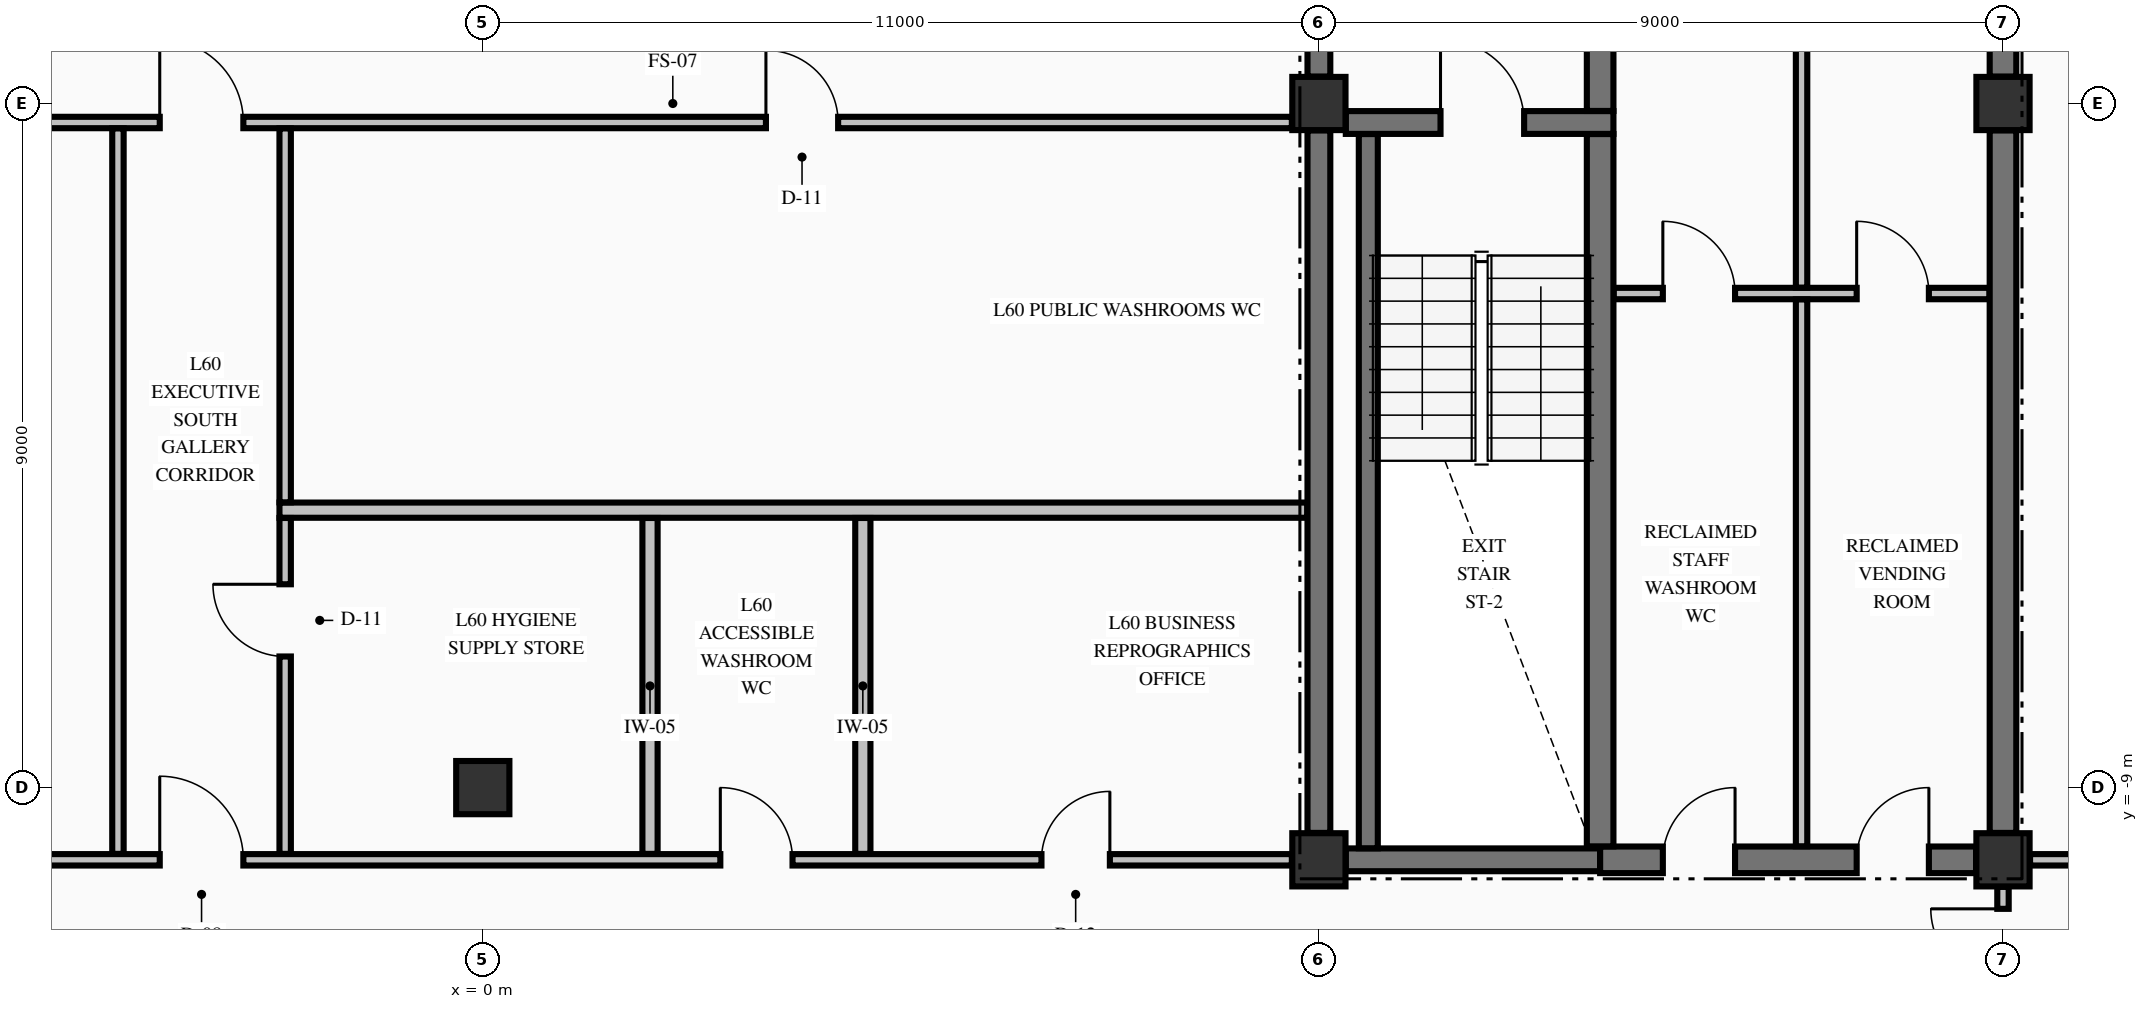
"""IFC4 building model, lengths in metres.
Left out: names, types, materials, properties, quantities, classifications, styles, units other than length and angle.
Written with IfcOpenShell. Run it as: python <this file> out.ifc"""

import sys

from ifc_helpers import new_model, si_unit, direction, frame, frame_2d, origin, origin_2d, place, context, subcontext, project, spatial, rectangle, extrude, element, fill, save


model = new_model("IFC4")
c1 = context("Model", 3, precision=1e-05, world=origin(), true_north=direction((0.0, 1.0)))
c2 = subcontext(c1, "Body", "Model", "MODEL_VIEW")
j1 = project(units=[si_unit("LENGTHUNIT", "METRE"), si_unit("PLANEANGLEUNIT", "RADIAN")], contexts=[c1])
p1 = place(None, origin())
s1 = spatial("IfcSite", under=j1, at=p1, CompositionType="ELEMENT")
p2 = place(p1, origin())
s2 = spatial("IfcBuilding", under=s1, at=p2, CompositionType="ELEMENT")
p3 = place(p2, frame((0.0, 0.0, 230.05)))
s3 = spatial("IfcBuildingStorey", under=s2, at=p3, CompositionType="ELEMENT", Elevation=230.05)
for number, where, z_axis, x_axis in (
    (1, (11.0, -9.95, -0.25), (0.0, 0.0, 1.0), (1.0, 0.0, 0.0)),
    (2, (11.0, 0.0, -0.25), (0.0, 0.0, 1.0), (1.0, 0.0, 0.0)),
    (3, (20.0, -9.95, -0.25), (0.0, 0.0, 1.0), (1.0, 0.0, 0.0)),
    (4, (0.0, -9.0, -0.25), (0.0, 0.0, 1.0), (1.0, 0.0, 0.0)),
    (5, (20.0, 0.0, -0.25), (0.0, 0.0, 1.0), (1.0, 0.0, 0.0)),
):
    element("IfcColumn", number, at=place(p3, frame(where, z_axis=z_axis, x_axis=x_axis)), inside=s3, PredefinedType="COLUMN", context=c2, shape_type="SweptSolid", body=[
        extrude(rectangle(XDim=0.7, YDim=0.7, at=origin_2d()), origin(), (0.0, 0.0, 1.0), 3.23),
    ])
p4 = place(p3, frame((11.354, -9.95, 0.0), z_axis=(0.0, 0.0, 1.0), x_axis=(1.0, 0.0, 0.0)))
e6 = element("IfcWall", 6, at=p4, inside=s3, PredefinedType="SHEAR", context=c2, shape_type="SweptSolid", body=[
    extrude(rectangle(XDim=3.346, YDim=0.3, at=frame_2d((1.673, 0.0))), origin(), (0.0, 0.0, 1.0), 2.98),
])
p5 = place(p3, frame((14.7, -9.95, 0.0), z_axis=(0.0, 0.0, 1.0), x_axis=(1.0, 0.0, 0.0)))
e7 = element("IfcWall", 7, at=p5, inside=s3, PredefinedType="SHEAR", context=c2, shape_type="SweptSolid", body=[
    extrude(rectangle(XDim=4.946, YDim=0.35, at=frame_2d((2.473, 0.0))), origin(), (0.0, 0.0, 1.0), 2.98),
])
p6 = place(p5, frame((0.825, 0.0, 0.0)))
e8 = element("IfcOpeningElement", 8, at=p6, cuts=e7, PredefinedType="OPENING", context=c2, shape_type="SweptSolid", body=[
    extrude(rectangle(XDim=0.95, YDim=2.15, at=frame_2d((0.475, 1.075))), frame((0.0, 0.185, 0.0), z_axis=(0.0, -1.0, 0.0), x_axis=(1.0, 0.0, 0.0)), (0.0, 0.0, 1.0), 0.37),
])
p7 = place(p5, frame((3.375, 0.0, 0.0)))
e9 = element("IfcOpeningElement", 9, at=p7, cuts=e7, PredefinedType="OPENING", context=c2, shape_type="SweptSolid", body=[
    extrude(rectangle(XDim=0.95, YDim=2.15, at=frame_2d((0.475, 1.075))), frame((0.0, 0.185, 0.0), z_axis=(0.0, -1.0, 0.0), x_axis=(1.0, 0.0, 0.0)), (0.0, 0.0, 1.0), 0.37),
])
p8 = place(p3, frame((11.354, -0.25, 0.0), z_axis=(0.0, 0.0, 1.0), x_axis=(1.0, 0.0, 0.0)))
e10 = element("IfcWall", 10, at=p8, inside=s3, PredefinedType="SHEAR", context=c2, shape_type="SweptSolid", body=[
    extrude(rectangle(XDim=3.521, YDim=0.3, at=frame_2d((1.76, 0.0))), origin(), (0.0, 0.0, 1.0), 2.98),
])
p9 = place(p8, frame((1.246, 0.0, 0.0)))
e11 = element("IfcOpeningElement", 11, at=p9, cuts=e10, PredefinedType="OPENING", context=c2, shape_type="SweptSolid", body=[
    extrude(rectangle(XDim=1.1, YDim=2.15, at=frame_2d((0.55, 1.075))), frame((0.0, 0.16, 0.0), z_axis=(0.0, -1.0, 0.0), x_axis=(1.0, 0.0, 0.0)), (0.0, 0.0, 1.0), 0.32),
])
p10 = place(p3, frame((-10.644, -9.95, 0.0), z_axis=(0.0, 0.0, 1.0), x_axis=(1.0, 0.0, 0.0)))
e12 = element("IfcWall", 12, at=p10, inside=s3, PredefinedType="PARTITIONING", context=c2, shape_type="SweptSolid", body=[
    extrude(rectangle(XDim=21.288, YDim=0.15, at=frame_2d((10.644, 0.0))), origin(), (0.0, 0.0, 1.0), 2.98),
])
p11 = place(p10, frame((6.394, 0.0, 0.0)))
e13 = element("IfcOpeningElement", 13, at=p11, cuts=e12, PredefinedType="OPENING", context=c2, shape_type="SweptSolid", body=[
    extrude(rectangle(XDim=1.1, YDim=2.15, at=frame_2d((0.55, 1.075))), frame((0.0, 0.085, 0.0), z_axis=(0.0, -1.0, 0.0), x_axis=(1.0, 0.0, 0.0)), (0.0, 0.0, 1.0), 0.17),
])
p12 = place(p10, frame((13.769, 0.0, 0.0)))
e14 = element("IfcOpeningElement", 14, at=p12, cuts=e12, PredefinedType="OPENING", context=c2, shape_type="SweptSolid", body=[
    extrude(rectangle(XDim=0.95, YDim=2.15, at=frame_2d((0.475, 1.075))), frame((0.0, 0.085, 0.0), z_axis=(0.0, -1.0, 0.0), x_axis=(1.0, 0.0, 0.0)), (0.0, 0.0, 1.0), 0.17),
])
p13 = place(p10, frame((17.994, 0.0, 0.0)))
e15 = element("IfcOpeningElement", 15, at=p13, cuts=e12, PredefinedType="OPENING", context=c2, shape_type="SweptSolid", body=[
    extrude(rectangle(XDim=0.9, YDim=2.15, at=frame_2d((0.45, 1.075))), frame((0.0, 0.085, 0.0), z_axis=(0.0, -1.0, 0.0), x_axis=(1.0, 0.0, 0.0)), (0.0, 0.0, 1.0), 0.17),
])
p14 = place(p3, frame((20.356, -9.95, 0.0), z_axis=(0.0, 0.0, 1.0), x_axis=(1.0, 0.0, 0.0)))
e16 = element("IfcWall", 16, at=p14, inside=s3, PredefinedType="PARTITIONING", context=c2, shape_type="SweptSolid", body=[
    extrude(rectangle(XDim=5.479, YDim=0.15, at=frame_2d((2.74, 0.0))), origin(), (0.0, 0.0, 1.0), 2.98),
])
p15 = place(p14, frame((2.144, 0.0, 0.0)))
e17 = element("IfcOpeningElement", 17, at=p15, cuts=e16, PredefinedType="OPENING", context=c2, shape_type="SweptSolid", body=[
    extrude(rectangle(XDim=1.0, YDim=2.15, at=frame_2d((0.5, 1.075))), frame((0.0, 0.085, 0.0), z_axis=(0.0, -1.0, 0.0), x_axis=(1.0, 0.0, 0.0)), (0.0, 0.0, 1.0), 0.17),
])
p16 = place(p3, frame((-2.675, -5.35, 0.0), z_axis=(0.0, 0.0, 1.0), x_axis=(1.0, 0.0, 0.0)))
e18 = element("IfcWall", 18, at=p16, inside=s3, PredefinedType="PARTITIONING", context=c2, shape_type="SweptSolid", body=[
    extrude(rectangle(XDim=13.522, YDim=0.2, at=frame_2d((6.761, 0.0))), origin(), (0.0, 0.0, 1.0), 2.98),
])
p17 = place(p3, frame((14.878, -2.5, 0.0), z_axis=(0.0, 0.0, 1.0), x_axis=(1.0, 0.0, 0.0)))
e19 = element("IfcWall", 19, at=p17, inside=s3, PredefinedType="PARTITIONING", context=c2, shape_type="SweptSolid", body=[
    extrude(rectangle(XDim=4.944, YDim=0.15, at=frame_2d((2.472, 0.0))), origin(), (0.0, 0.0, 1.0), 2.98),
])
p18 = place(p17, frame((0.647, 0.0, 0.0)))
e20 = element("IfcOpeningElement", 20, at=p18, cuts=e19, PredefinedType="OPENING", context=c2, shape_type="SweptSolid", body=[
    extrude(rectangle(XDim=0.95, YDim=2.15, at=frame_2d((0.475, 1.075))), frame((0.0, 0.085, 0.0), z_axis=(0.0, -1.0, 0.0), x_axis=(1.0, 0.0, 0.0)), (0.0, 0.0, 1.0), 0.17),
])
p19 = place(p17, frame((3.197, 0.0, 0.0)))
e21 = element("IfcOpeningElement", 21, at=p19, cuts=e19, PredefinedType="OPENING", context=c2, shape_type="SweptSolid", body=[
    extrude(rectangle(XDim=0.95, YDim=2.15, at=frame_2d((0.475, 1.075))), frame((0.0, 0.085, 0.0), z_axis=(0.0, -1.0, 0.0), x_axis=(1.0, 0.0, 0.0)), (0.0, 0.0, 1.0), 0.17),
])
p20 = place(p3, frame((-10.644, -0.25, 0.0), z_axis=(0.0, 0.0, 1.0), x_axis=(1.0, 0.0, 0.0)))
e22 = element("IfcWall", 22, at=p20, inside=s3, PredefinedType="PARTITIONING", context=c2, shape_type="SweptSolid", body=[
    extrude(rectangle(XDim=21.288, YDim=0.15, at=frame_2d((10.644, 0.0))), origin(), (0.0, 0.0, 1.0), 2.98),
])
p21 = place(p20, frame((6.394, 0.0, 0.0)))
e23 = element("IfcOpeningElement", 23, at=p21, cuts=e22, PredefinedType="OPENING", context=c2, shape_type="SweptSolid", body=[
    extrude(rectangle(XDim=1.1, YDim=2.15, at=frame_2d((0.55, 1.075))), frame((0.0, 0.085, 0.0), z_axis=(0.0, -1.0, 0.0), x_axis=(1.0, 0.0, 0.0)), (0.0, 0.0, 1.0), 0.17),
])
p22 = place(p20, frame((2.219, 0.0, 0.0)))
e24 = element("IfcOpeningElement", 24, at=p22, cuts=e22, PredefinedType="OPENING", context=c2, shape_type="SweptSolid", body=[
    extrude(rectangle(XDim=1.05, YDim=2.15, at=frame_2d((0.525, 1.075))), frame((0.0, 0.085, 0.0), z_axis=(0.0, -1.0, 0.0), x_axis=(1.0, 0.0, 0.0)), (0.0, 0.0, 1.0), 0.17),
])
p23 = place(p20, frame((14.369, 0.0, 0.0)))
e25 = element("IfcOpeningElement", 25, at=p23, cuts=e22, PredefinedType="OPENING", context=c2, shape_type="SweptSolid", body=[
    extrude(rectangle(XDim=0.95, YDim=2.15, at=frame_2d((0.475, 1.075))), frame((0.0, 0.085, 0.0), z_axis=(0.0, -1.0, 0.0), x_axis=(1.0, 0.0, 0.0)), (0.0, 0.0, 1.0), 0.17),
])
p24 = place(p3, frame((11.0, -9.596, 0.0), z_axis=(0.0, 0.0, 1.0), x_axis=(0.0, 1.0, 0.0)))
e26 = element("IfcWall", 26, at=p24, inside=s3, PredefinedType="SHEAR", context=c2, shape_type="SweptSolid", body=[
    extrude(rectangle(XDim=9.242, YDim=0.3, at=frame_2d((4.621, 0.0))), origin(), (0.0, 0.0, 1.0), 2.98),
])
p25 = place(p3, frame((11.0, 0.354, 0.0), z_axis=(0.0, 0.0, 1.0), x_axis=(0.0, 1.0, 0.0)))
e27 = element("IfcWall", 27, at=p25, inside=s3, PredefinedType="SHEAR", context=c2, shape_type="SweptSolid", body=[
    extrude(rectangle(XDim=2.394, YDim=0.3, at=frame_2d((1.197, 0.0))), origin(), (0.0, 0.0, 1.0), 2.98),
])
p26 = place(p25, frame((0.746, 0.0, 0.0)))
e28 = element("IfcOpeningElement", 28, at=p26, cuts=e27, PredefinedType="OPENING", context=c2, shape_type="SweptSolid", body=[
    extrude(rectangle(XDim=1.1, YDim=2.15, at=frame_2d((0.55, 1.075))), frame((0.0, 0.16, 0.0), z_axis=(0.0, -1.0, 0.0), x_axis=(1.0, 0.0, 0.0)), (0.0, 0.0, 1.0), 0.32),
])
p27 = place(p3, frame((11.65, -9.798, 0.0), z_axis=(0.0, 0.0, 1.0), x_axis=(0.0, 1.0, 0.0)))
e29 = element("IfcWall", 29, at=p27, inside=s3, PredefinedType="SOLIDWALL", context=c2, shape_type="SweptSolid", body=[
    extrude(rectangle(XDim=9.396, YDim=0.25, at=frame_2d((4.698, 0.0))), origin(), (0.0, 0.0, 1.0), 2.98),
])
p28 = place(p3, frame((14.7, -9.773, 0.0), z_axis=(0.0, 0.0, 1.0), x_axis=(0.0, 1.0, 0.0)))
e30 = element("IfcWall", 30, at=p28, inside=s3, PredefinedType="SHEAR", context=c2, shape_type="SweptSolid", body=[
    extrude(rectangle(XDim=9.371, YDim=0.35, at=frame_2d((4.686, 0.0))), origin(), (0.0, 0.0, 1.0), 2.98),
])
p29 = place(p3, frame((14.7, -0.098, 0.0), z_axis=(0.0, 0.0, 1.0), x_axis=(0.0, 1.0, 0.0)))
e31 = element("IfcWall", 31, at=p29, inside=s3, PredefinedType="SHEAR", context=c2, shape_type="SweptSolid", body=[
    extrude(rectangle(XDim=2.846, YDim=0.35, at=frame_2d((1.423, 0.0))), origin(), (0.0, 0.0, 1.0), 2.98),
])
p30 = place(p3, frame((20.0, -9.596, 0.0), z_axis=(0.0, 0.0, 1.0), x_axis=(0.0, 1.0, 0.0)))
e32 = element("IfcWall", 32, at=p30, inside=s3, PredefinedType="SHEAR", context=c2, shape_type="SweptSolid", body=[
    extrude(rectangle(XDim=9.242, YDim=0.35, at=frame_2d((4.621, 0.0))), origin(), (0.0, 0.0, 1.0), 2.98),
])
p31 = place(p3, frame((20.0, 0.354, 0.0), z_axis=(0.0, 0.0, 1.0), x_axis=(0.0, 1.0, 0.0)))
e33 = element("IfcWall", 33, at=p31, inside=s3, PredefinedType="SHEAR", context=c2, shape_type="SweptSolid", body=[
    extrude(rectangle(XDim=4.819, YDim=0.35, at=frame_2d((2.41, 0.0))), origin(), (0.0, 0.0, 1.0), 2.98),
])
p32 = place(p3, frame((-4.8, -9.872, 0.0), z_axis=(0.0, 0.0, 1.0), x_axis=(0.0, 1.0, 0.0)))
e34 = element("IfcWall", 34, at=p32, inside=s3, PredefinedType="PARTITIONING", context=c2, shape_type="SweptSolid", body=[
    extrude(rectangle(XDim=9.544, YDim=0.15, at=frame_2d((4.772, 0.0))), origin(), (0.0, 0.0, 1.0), 2.98),
])
p33 = place(p3, frame((-2.6, -9.872, 0.0), z_axis=(0.0, 0.0, 1.0), x_axis=(0.0, 1.0, 0.0)))
e35 = element("IfcWall", 35, at=p33, inside=s3, PredefinedType="PARTITIONING", context=c2, shape_type="SweptSolid", body=[
    extrude(rectangle(XDim=4.419, YDim=0.15, at=frame_2d((2.209, 0.0))), origin(), (0.0, 0.0, 1.0), 2.98),
])
p34 = place(p33, frame((2.597, 0.0, 0.0)))
e36 = element("IfcOpeningElement", 36, at=p34, cuts=e35, PredefinedType="OPENING", context=c2, shape_type="SweptSolid", body=[
    extrude(rectangle(XDim=0.95, YDim=2.15, at=frame_2d((0.475, 1.075))), frame((0.0, 0.085, 0.0), z_axis=(0.0, -1.0, 0.0), x_axis=(1.0, 0.0, 0.0)), (0.0, 0.0, 1.0), 0.17),
])
p35 = place(p3, frame((-2.6, -5.247, 0.0), z_axis=(0.0, 0.0, 1.0), x_axis=(0.0, 1.0, 0.0)))
e37 = element("IfcWall", 37, at=p35, inside=s3, PredefinedType="PARTITIONING", context=c2, shape_type="SweptSolid", body=[
    extrude(rectangle(XDim=4.919, YDim=0.15, at=frame_2d((2.459, 0.0))), origin(), (0.0, 0.0, 1.0), 2.98),
])
for number, where, z_axis, x_axis in (
    (38, (2.2, -9.872, 0.0), (0.0, 0.0, 1.0), (0.0, 1.0, 0.0)),
    (39, (5.0, -9.872, 0.0), (0.0, 0.0, 1.0), (0.0, 1.0, 0.0)),
):
    element("IfcWall", number, at=place(p3, frame(where, z_axis=z_axis, x_axis=x_axis)), inside=s3, PredefinedType="PARTITIONING", context=c2, shape_type="SweptSolid", body=[
        extrude(rectangle(XDim=4.419, YDim=0.2, at=frame_2d((2.209, 0.0))), origin(), (0.0, 0.0, 1.0), 2.98),
    ])
p36 = place(p3, frame((17.35, -9.772, 0.0), z_axis=(0.0, 0.0, 1.0), x_axis=(0.0, 1.0, 0.0)))
e40 = element("IfcWall", 40, at=p36, inside=s3, PredefinedType="PARTITIONING", context=c2, shape_type="SweptSolid", body=[
    extrude(rectangle(XDim=7.194, YDim=0.15, at=frame_2d((3.597, 0.0))), origin(), (0.0, 0.0, 1.0), 2.98),
])
p37 = place(p3, frame((17.35, -2.422, 0.0), z_axis=(0.0, 0.0, 1.0), x_axis=(0.0, 1.0, 0.0)))
e41 = element("IfcWall", 41, at=p37, inside=s3, PredefinedType="PARTITIONING", context=c2, shape_type="SweptSolid", body=[
    extrude(rectangle(XDim=7.144, YDim=0.15, at=frame_2d((3.572, 0.0))), origin(), (0.0, 0.0, 1.0), 2.98),
])
p38 = place(p3, frame((20.0, -12.122, 0.0), z_axis=(0.0, 0.0, 1.0), x_axis=(0.0, 1.0, 0.0)))
e42 = element("IfcWall", 42, at=p38, inside=s3, PredefinedType="PARTITIONING", context=c2, shape_type="SweptSolid", body=[
    extrude(rectangle(XDim=1.816, YDim=0.15, at=frame_2d((0.908, 0.0))), origin(), (0.0, 0.0, 1.0), 2.98),
])
p39 = place(p38, frame((0.577, 0.0, 0.0)))
e43 = element("IfcOpeningElement", 43, at=p39, cuts=e42, PredefinedType="OPENING", context=c2, shape_type="SweptSolid", body=[
    extrude(rectangle(XDim=0.95, YDim=2.15, at=frame_2d((0.475, 1.075))), frame((0.0, 0.085, 0.0), z_axis=(0.0, -1.0, 0.0), x_axis=(1.0, 0.0, 0.0)), (0.0, 0.0, 1.0), 0.17),
])
p40 = place(p9, origin())
e44 = element("IfcDoor", 44, at=p40, inside=s3, OperationType="SINGLE_SWING_LEFT", PredefinedType="DOOR", context=c2, shape_type="SweptSolid", body=[
    extrude(rectangle(XDim=1.1, YDim=2.15, at=frame_2d((0.55, 1.075))), frame((0.0, 0.025, 0.0), z_axis=(0.0, -1.0, 0.0), x_axis=(1.0, 0.0, 0.0)), (0.0, 0.0, 1.0), 0.05),
])
fill(e11, e44)
p41 = place(p6, origin())
e45 = element("IfcDoor", 45, at=p41, inside=s3, OperationType="SINGLE_SWING_RIGHT", PredefinedType="DOOR", context=c2, shape_type="SweptSolid", body=[
    extrude(rectangle(XDim=0.95, YDim=2.15, at=frame_2d((0.475, 1.075))), frame((0.0, 0.025, 0.0), z_axis=(0.0, -1.0, 0.0), x_axis=(1.0, 0.0, 0.0)), (0.0, 0.0, 1.0), 0.05),
])
fill(e8, e45)
p42 = place(p18, origin())
e46 = element("IfcDoor", 46, at=p42, inside=s3, OperationType="SINGLE_SWING_LEFT", PredefinedType="DOOR", context=c2, shape_type="SweptSolid", body=[
    extrude(rectangle(XDim=0.95, YDim=2.15, at=frame_2d((0.475, 1.075))), frame((0.0, 0.025, 0.0), z_axis=(0.0, -1.0, 0.0), x_axis=(1.0, 0.0, 0.0)), (0.0, 0.0, 1.0), 0.05),
])
fill(e20, e46)
p43 = place(p7, origin())
e47 = element("IfcDoor", 47, at=p43, inside=s3, OperationType="SINGLE_SWING_RIGHT", PredefinedType="DOOR", context=c2, shape_type="SweptSolid", body=[
    extrude(rectangle(XDim=0.95, YDim=2.15, at=frame_2d((0.475, 1.075))), frame((0.0, 0.025, 0.0), z_axis=(0.0, -1.0, 0.0), x_axis=(1.0, 0.0, 0.0)), (0.0, 0.0, 1.0), 0.05),
])
fill(e9, e47)
p44 = place(p19, origin())
e48 = element("IfcDoor", 48, at=p44, inside=s3, OperationType="SINGLE_SWING_LEFT", PredefinedType="DOOR", context=c2, shape_type="SweptSolid", body=[
    extrude(rectangle(XDim=0.95, YDim=2.15, at=frame_2d((0.475, 1.075))), frame((0.0, 0.025, 0.0), z_axis=(0.0, -1.0, 0.0), x_axis=(1.0, 0.0, 0.0)), (0.0, 0.0, 1.0), 0.05),
])
fill(e21, e48)
p45 = place(p11, origin())
e49 = element("IfcDoor", 49, at=p45, inside=s3, OperationType="SINGLE_SWING_LEFT", PredefinedType="DOOR", context=c2, shape_type="SweptSolid", body=[
    extrude(rectangle(XDim=1.1, YDim=2.15, at=frame_2d((0.55, 1.075))), frame((0.0, 0.025, 0.0), z_axis=(0.0, -1.0, 0.0), x_axis=(1.0, 0.0, 0.0)), (0.0, 0.0, 1.0), 0.05),
])
fill(e13, e49)
p46 = place(p21, origin())
e50 = element("IfcDoor", 50, at=p46, inside=s3, OperationType="SINGLE_SWING_LEFT", PredefinedType="DOOR", context=c2, shape_type="SweptSolid", body=[
    extrude(rectangle(XDim=1.1, YDim=2.15, at=frame_2d((0.55, 1.075))), frame((0.0, 0.025, 0.0), z_axis=(0.0, -1.0, 0.0), x_axis=(1.0, 0.0, 0.0)), (0.0, 0.0, 1.0), 0.05),
])
fill(e23, e50)
p47 = place(p23, origin())
e51 = element("IfcDoor", 51, at=p47, inside=s3, OperationType="SINGLE_SWING_LEFT", PredefinedType="DOOR", context=c2, shape_type="SweptSolid", body=[
    extrude(rectangle(XDim=0.95, YDim=2.15, at=frame_2d((0.475, 1.075))), frame((0.0, 0.025, 0.0), z_axis=(0.0, -1.0, 0.0), x_axis=(1.0, 0.0, 0.0)), (0.0, 0.0, 1.0), 0.05),
])
fill(e25, e51)
p48 = place(p34, origin())
e52 = element("IfcDoor", 52, at=p48, inside=s3, OperationType="SINGLE_SWING_RIGHT", PredefinedType="DOOR", context=c2, shape_type="SweptSolid", body=[
    extrude(rectangle(XDim=0.95, YDim=2.15, at=frame_2d((0.475, 1.075))), frame((0.0, 0.025, 0.0), z_axis=(0.0, -1.0, 0.0), x_axis=(1.0, 0.0, 0.0)), (0.0, 0.0, 1.0), 0.05),
])
fill(e36, e52)
p49 = place(p12, origin())
e53 = element("IfcDoor", 53, at=p49, inside=s3, OperationType="SINGLE_SWING_LEFT", PredefinedType="DOOR", context=c2, shape_type="SweptSolid", body=[
    extrude(rectangle(XDim=0.95, YDim=2.15, at=frame_2d((0.475, 1.075))), frame((0.0, 0.025, 0.0), z_axis=(0.0, -1.0, 0.0), x_axis=(1.0, 0.0, 0.0)), (0.0, 0.0, 1.0), 0.05),
])
fill(e14, e53)
p50 = place(p13, origin())
e54 = element("IfcDoor", 54, at=p50, inside=s3, OperationType="SINGLE_SWING_RIGHT", PredefinedType="DOOR", context=c2, shape_type="SweptSolid", body=[
    extrude(rectangle(XDim=0.9, YDim=2.15, at=frame_2d((0.45, 1.075))), frame((0.0, 0.025, 0.0), z_axis=(0.0, -1.0, 0.0), x_axis=(1.0, 0.0, 0.0)), (0.0, 0.0, 1.0), 0.05),
])
fill(e15, e54)
p51 = place(p39, origin())
e55 = element("IfcDoor", 55, at=p51, inside=s3, OperationType="SINGLE_SWING_RIGHT", PredefinedType="DOOR", context=c2, shape_type="SweptSolid", body=[
    extrude(rectangle(XDim=0.95, YDim=2.15, at=frame_2d((0.475, 1.075))), frame((0.0, 0.025, 0.0), z_axis=(0.0, -1.0, 0.0), x_axis=(1.0, 0.0, 0.0)), (0.0, 0.0, 1.0), 0.05),
])
fill(e43, e55)
save(model, sys.argv[1])
